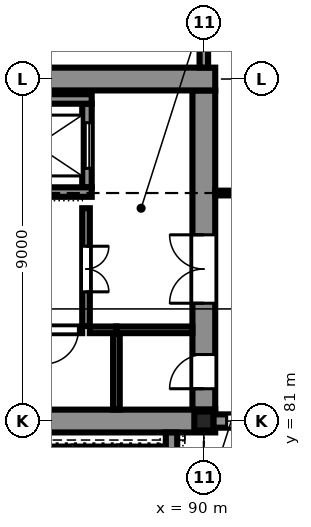
"""IFC4 building model, lengths in metres.
Left out: names, types, materials, properties, quantities, classifications, styles, units other than length and angle.
Written with IfcOpenShell. Run it as: python <this file> out.ifc"""

import sys

from ifc_helpers import new_model, si_unit, direction, frame, frame_2d, origin, origin_2d, place, context, subcontext, project, spatial, polyline, rectangle, hollow_rectangle, outline, extrude, element, fill, save


model = new_model("IFC4")
c1 = context("Model", 3, precision=1e-05, world=origin(), true_north=direction((0.0, 1.0)))
c2 = subcontext(c1, "Body", "Model", "MODEL_VIEW")
j1 = project(units=[si_unit("LENGTHUNIT", "METRE"), si_unit("PLANEANGLEUNIT", "RADIAN")], contexts=[c1])
p1 = place(None, origin())
s1 = spatial("IfcSite", under=j1, at=p1, CompositionType="ELEMENT")
p2 = place(p1, origin())
s2 = spatial("IfcBuilding", under=s1, at=p2, CompositionType="ELEMENT")
p3 = place(p2, origin())
s3 = spatial("IfcBuildingStorey", under=s2, at=p3, CompositionType="ELEMENT", Elevation=0.0)
p4 = place(p3, frame((90.0, 81.0, -2.1), z_axis=(0.0, 0.0, 1.0), x_axis=(1.0, 0.0, 0.0)))
e1 = element("IfcColumn", 1, at=p4, inside=s3, PredefinedType="COLUMN", context=c2, shape_type="SweptSolid", body=[
    extrude(hollow_rectangle(XDim=0.5, YDim=0.5, WallThickness=0.032, at=origin_2d()), origin(), (0.0, 0.0, 1.0), 9.6),
])
p5 = place(p3, frame((71.7, 81.0, -2.1), z_axis=(0.0, 0.0, 1.0), x_axis=(1.0, 0.0, 0.0)))
e2 = element("IfcWall", 2, at=p5, inside=s3, PredefinedType="SOLIDWALL", context=c2, shape_type="SweptSolid", body=[
    extrude(rectangle(XDim=18.6, YDim=0.6, at=frame_2d((9.3, 0.0))), origin(), (0.0, 0.0, 1.0), 9.6),
])
p6 = place(p5, frame((1.6, 0.0, 2.1)))
e3 = element("IfcOpeningElement", 3, at=p6, cuts=e2, PredefinedType="OPENING", context=c2, shape_type="SweptSolid", body=[
    extrude(rectangle(XDim=1.8, YDim=2.1, at=frame_2d((0.9, 1.05))), frame((0.0, 0.31, 0.0), z_axis=(0.0, -1.0, 0.0), x_axis=(1.0, 0.0, 0.0)), (0.0, 0.0, 1.0), 0.62),
])
p7 = place(p5, frame((5.6, 0.0, 2.1)))
e4 = element("IfcOpeningElement", 4, at=p7, cuts=e2, PredefinedType="OPENING", context=c2, shape_type="SweptSolid", body=[
    extrude(rectangle(XDim=1.8, YDim=2.1, at=frame_2d((0.9, 1.05))), frame((0.0, 0.31, 0.0), z_axis=(0.0, -1.0, 0.0), x_axis=(1.0, 0.0, 0.0)), (0.0, 0.0, 1.0), 0.62),
])
p8 = place(p5, frame((9.1, 0.0, 2.1)))
e5 = element("IfcOpeningElement", 5, at=p8, cuts=e2, PredefinedType="OPENING", context=c2, shape_type="SweptSolid", body=[
    extrude(rectangle(XDim=1.8, YDim=2.1, at=frame_2d((0.9, 1.05))), frame((0.0, 0.31, 0.0), z_axis=(0.0, -1.0, 0.0), x_axis=(1.0, 0.0, 0.0)), (0.0, 0.0, 1.0), 0.62),
])
p9 = place(p3, frame((71.7, 90.0, -2.1), z_axis=(0.0, 0.0, 1.0), x_axis=(1.0, 0.0, 0.0)))
e6 = element("IfcWall", 6, at=p9, inside=s3, PredefinedType="SOLIDWALL", context=c2, shape_type="SweptSolid", body=[
    extrude(rectangle(XDim=18.6, YDim=0.6, at=frame_2d((9.3, 0.0))), origin(), (0.0, 0.0, 1.0), 9.6),
])
p10 = place(p3, frame((90.0, 81.3, -2.1), z_axis=(0.0, 0.0, 1.0), x_axis=(0.0, 1.0, 0.0)))
e7 = element("IfcWall", 7, at=p10, inside=s3, PredefinedType="SOLIDWALL", context=c2, shape_type="SweptSolid", body=[
    extrude(rectangle(XDim=8.4, YDim=0.6, at=frame_2d((4.2, 0.0))), origin(), (0.0, 0.0, 1.0), 9.6),
])
p11 = place(p10, frame((2.8, 0.0, 2.1)))
e8 = element("IfcOpeningElement", 8, at=p11, cuts=e7, PredefinedType="OPENING", context=c2, shape_type="SweptSolid", body=[
    extrude(rectangle(XDim=1.8, YDim=2.1, at=frame_2d((0.9, 1.05))), frame((0.0, 0.31, 0.0), z_axis=(0.0, -1.0, 0.0), x_axis=(1.0, 0.0, 0.0)), (0.0, 0.0, 1.0), 0.62),
])
p12 = place(p10, frame((0.55, 0.0, 2.1)))
e9 = element("IfcOpeningElement", 9, at=p12, cuts=e7, PredefinedType="OPENING", context=c2, shape_type="SweptSolid", body=[
    extrude(rectangle(XDim=0.9, YDim=2.1, at=frame_2d((0.45, 1.05))), frame((0.0, 0.31, 0.0), z_axis=(0.0, -1.0, 0.0), x_axis=(1.0, 0.0, 0.0)), (0.0, 0.0, 1.0), 0.62),
])
p13 = place(p3, frame((90.25, 81.0, 0.0), z_axis=(0.0, 0.0, 1.0), x_axis=(1.0, 0.0, 0.0)))
e10 = element("IfcWall", 10, at=p13, inside=s3, PredefinedType="SOLIDWALL", context=c2, shape_type="SweptSolid", body=[
    extrude(rectangle(XDim=8.395, YDim=0.35, at=frame_2d((4.197, 0.0))), origin(), (0.0, 0.0, 1.0), 6.692),
])
p14 = place(p13, frame((3.05, 0.0, 0.0)))
e11 = element("IfcOpeningElement", 11, at=p14, cuts=e10, PredefinedType="OPENING", context=c2, shape_type="SweptSolid", body=[
    extrude(rectangle(XDim=2.4, YDim=3.0, at=frame_2d((1.2, 1.5))), frame((0.0, 0.185, 0.0), z_axis=(0.0, -1.0, 0.0), x_axis=(1.0, 0.0, 0.0)), (0.0, 0.0, 1.0), 0.37),
])
p15 = place(p13, frame((0.35, 0.0, 0.9)))
e12 = element("IfcOpeningElement", 12, at=p15, cuts=e10, PredefinedType="OPENING", context=c2, shape_type="SweptSolid", body=[
    extrude(rectangle(XDim=1.8, YDim=3.6, at=frame_2d((0.9, 1.8))), frame((0.0, 0.185, 0.0), z_axis=(0.0, -1.0, 0.0), x_axis=(1.0, 0.0, 0.0)), (0.0, 0.0, 1.0), 0.37),
])
p16 = place(p13, frame((6.35, 0.0, 0.9)))
e13 = element("IfcOpeningElement", 13, at=p16, cuts=e10, PredefinedType="OPENING", context=c2, shape_type="SweptSolid", body=[
    extrude(rectangle(XDim=1.8, YDim=3.6, at=frame_2d((0.9, 1.8))), frame((0.0, 0.185, 0.0), z_axis=(0.0, -1.0, 0.0), x_axis=(1.0, 0.0, 0.0)), (0.0, 0.0, 1.0), 0.37),
])
p17 = place(p3, frame((89.15, 72.6, 0.0), z_axis=(0.0, 0.0, 1.0), x_axis=(0.0, 1.0, 0.0)))
e14 = element("IfcWall", 14, at=p17, inside=s3, PredefinedType="SOLIDWALL", context=c2, shape_type="SweptSolid", body=[
    extrude(rectangle(XDim=8.098, YDim=0.3, at=frame_2d((4.049, 0.0))), origin(), (0.0, 0.0, 1.0), 6.902),
])
for number, where, z_axis, x_axis in (
    (15, (83.65, 87.025, -1.6), (0.0, 0.0, 1.0), (1.0, 0.0, 0.0)),
    (16, (83.65, 89.475, -1.6), (0.0, 0.0, 1.0), (1.0, 0.0, 0.0)),
):
    element("IfcWall", number, at=place(p3, frame(where, z_axis=z_axis, x_axis=x_axis)), inside=s3, PredefinedType="SOLIDWALL", context=c2, shape_type="SweptSolid", body=[
        extrude(rectangle(XDim=3.4, YDim=0.25, at=frame_2d((1.7, 0.0))), origin(), (0.0, 0.0, 1.0), 8.436),
    ])
p18 = place(p3, frame((86.925, 87.15, -1.6), z_axis=(0.0, 0.0, 1.0), x_axis=(0.0, 1.0, 0.0)))
e17 = element("IfcWall", 17, at=p18, inside=s3, PredefinedType="SOLIDWALL", context=c2, shape_type="SweptSolid", body=[
    extrude(rectangle(XDim=2.2, YDim=0.25, at=frame_2d((1.1, 0.0))), origin(), (0.0, 0.0, 1.0), 8.436),
])
p19 = place(p18, frame((0.5, 0.0, 1.6)))
e18 = element("IfcOpeningElement", 18, at=p19, cuts=e17, PredefinedType="OPENING", context=c2, shape_type="SweptSolid", body=[
    extrude(rectangle(XDim=1.2, YDim=2.1, at=frame_2d((0.6, 1.05))), frame((0.0, 0.135, 0.0), z_axis=(0.0, -1.0, 0.0), x_axis=(1.0, 0.0, 0.0)), (0.0, 0.0, 1.0), 0.27),
])
p20 = place(p3, frame((90.302, 87.0, 0.0), z_axis=(0.0, 0.0, 1.0), x_axis=(1.0, 0.0, 0.0)))
e19 = element("IfcWall", 19, at=p20, inside=s3, PredefinedType="PARTITIONING", context=c2, shape_type="SweptSolid", body=[
    extrude(rectangle(XDim=8.76, YDim=0.125, at=frame_2d((4.38, 0.0))), origin(), (0.0, 0.0, 1.0), 6.757),
])
p21 = place(p20, frame((3.598, 0.0, 0.0)))
e20 = element("IfcOpeningElement", 20, at=p21, cuts=e19, PredefinedType="OPENING", context=c2, shape_type="SweptSolid", body=[
    extrude(rectangle(XDim=1.2, YDim=2.1, at=frame_2d((0.6, 1.05))), frame((0.0, 0.073, 0.0), z_axis=(0.0, -1.0, 0.0), x_axis=(1.0, 0.0, 0.0)), (0.0, 0.0, 1.0), 0.145),
])
p22 = place(p3, frame((90.0, 95.887, 0.0), z_axis=(0.0, 0.0, 1.0), x_axis=(0.0, -1.0, 0.0)))
e21 = element("IfcWall", 21, at=p22, inside=s3, PredefinedType="PARTITIONING", context=c2, shape_type="SweptSolid", body=[
    extrude(rectangle(XDim=5.585, YDim=0.225, at=frame_2d((2.793, 0.0))), origin(), (0.0, 0.0, 1.0), 6.6),
])
p23 = place(p3, frame((86.8, 83.4, 0.0), z_axis=(0.0, 0.0, 1.0), x_axis=(-1.0, 0.0, 0.0)))
e22 = element("IfcWall", 22, at=p23, inside=s3, PredefinedType="PARTITIONING", context=c2, shape_type="SweptSolid", body=[
    extrude(rectangle(XDim=1.1, YDim=0.175, at=frame_2d((0.55, 0.0))), origin(), (0.0, 0.0, 1.0), 6.459),
])
p24 = place(p23, frame((0.1, 0.0, 0.0)))
e23 = element("IfcOpeningElement", 23, at=p24, cuts=e22, PredefinedType="OPENING", context=c2, shape_type="SweptSolid", body=[
    extrude(rectangle(XDim=0.9, YDim=2.1, at=frame_2d((0.45, 1.05))), frame((0.0, 0.097, 0.0), z_axis=(0.0, -1.0, 0.0), x_axis=(1.0, 0.0, 0.0)), (0.0, 0.0, 1.0), 0.195),
])
p25 = place(p3, frame((86.9, 86.6, 0.0), z_axis=(0.0, 0.0, 1.0), x_axis=(0.0, -1.0, 0.0)))
e24 = element("IfcWall", 24, at=p25, inside=s3, PredefinedType="PARTITIONING", context=c2, shape_type="SweptSolid", body=[
    extrude(rectangle(XDim=3.1, YDim=0.2, at=frame_2d((1.55, 0.0))), origin(), (0.0, 0.0, 1.0), 6.6),
])
p26 = place(p25, frame((1.0, 0.0, 0.0)))
e25 = element("IfcOpeningElement", 25, at=p26, cuts=e24, PredefinedType="OPENING", context=c2, shape_type="SweptSolid", body=[
    extrude(rectangle(XDim=1.2, YDim=2.1, at=frame_2d((0.6, 1.05))), frame((0.0, 0.11, 0.0), z_axis=(0.0, -1.0, 0.0), x_axis=(1.0, 0.0, 0.0)), (0.0, 0.0, 1.0), 0.22),
])
p27 = place(p3, frame((87.7, 83.4, 0.0), z_axis=(0.0, 0.0, 1.0), x_axis=(-1.0, 0.0, 0.0)))
e26 = element("IfcWall", 26, at=p27, inside=s3, PredefinedType="PARTITIONING", context=c2, shape_type="SweptSolid", body=[
    extrude(rectangle(XDim=0.7, YDim=0.175, at=frame_2d((0.35, 0.0))), origin(), (0.0, 0.0, 1.0), 6.459),
])
for number, where, z_axis, x_axis in (
    (27, (89.698, 83.4, 0.0), (0.0, 0.0, 1.0), (-1.0, 0.0, 0.0)),
    (28, (87.7, 83.3, 0.0), (0.0, 0.0, 1.0), (0.0, -1.0, 0.0)),
):
    element("IfcWall", number, at=place(p3, frame(where, z_axis=z_axis, x_axis=x_axis)), inside=s3, PredefinedType="PARTITIONING", context=c2, shape_type="SweptSolid", body=[
        extrude(rectangle(XDim=1.998, YDim=0.175, at=frame_2d((0.999, 0.0))), origin(), (0.0, 0.0, 1.0), 6.459),
    ])
p28 = place(p15, origin())
e29 = element("IfcWindow", 29, at=p28, inside=s3, PartitioningType="TRIPLE_PANEL_HORIZONTAL", PredefinedType="WINDOW", context=c2, shape_type="SweptSolid", body=[
    extrude(outline(polyline([(0.0, 0.0), (1.8, 0.0), (1.8, 3.6), (0.0, 3.6), (0.0, 0.0)]), holes=[polyline([(0.07, 0.07), (1.73, 0.07), (1.73, 3.53), (0.07, 3.53), (0.07, 0.07)])]), frame((0.0, 0.03, 0.0), z_axis=(0.0, -1.0, 0.0), x_axis=(1.0, 0.0, 0.0)), (0.0, 0.0, 1.0), 0.06),
    extrude(rectangle(XDim=1.66, YDim=0.04, at=frame_2d((0.9, 1.217))), frame((0.0, 0.021, 0.0), z_axis=(0.0, -1.0, 0.0), x_axis=(1.0, 0.0, 0.0)), (0.0, 0.0, 1.0), 0.043),
    extrude(rectangle(XDim=1.66, YDim=0.04, at=frame_2d((0.9, 2.383))), frame((0.0, 0.021, 0.0), z_axis=(0.0, -1.0, 0.0), x_axis=(1.0, 0.0, 0.0)), (0.0, 0.0, 1.0), 0.043),
    extrude(outline(polyline([(0.07, 0.07), (1.73, 0.07), (1.73, 1.197), (0.07, 1.197), (0.07, 0.07)]), holes=[polyline([(0.1, 0.1), (1.7, 0.1), (1.7, 1.167), (0.1, 1.167), (0.1, 0.1)])]), frame((0.0, 0.022, 0.0), z_axis=(0.0, -1.0, 0.0), x_axis=(1.0, 0.0, 0.0)), (0.0, 0.0, 1.0), 0.045),
    extrude(rectangle(XDim=1.6, YDim=1.067, at=frame_2d((0.9, 0.633))), frame((0.0, 0.006, 0.0), z_axis=(0.0, -1.0, 0.0), x_axis=(1.0, 0.0, 0.0)), (0.0, 0.0, 1.0), 0.012),
    extrude(outline(polyline([(0.07, 1.237), (1.73, 1.237), (1.73, 2.363), (0.07, 2.363), (0.07, 1.237)]), holes=[polyline([(0.1, 1.267), (1.7, 1.267), (1.7, 2.333), (0.1, 2.333), (0.1, 1.267)])]), frame((0.0, 0.022, 0.0), z_axis=(0.0, -1.0, 0.0), x_axis=(1.0, 0.0, 0.0)), (0.0, 0.0, 1.0), 0.045),
    extrude(rectangle(XDim=1.6, YDim=1.066, at=frame_2d((0.9, 1.8))), frame((0.0, 0.006, 0.0), z_axis=(0.0, -1.0, 0.0), x_axis=(1.0, 0.0, 0.0)), (0.0, 0.0, 1.0), 0.012),
    extrude(outline(polyline([(0.07, 2.403), (1.73, 2.403), (1.73, 3.53), (0.07, 3.53), (0.07, 2.403)]), holes=[polyline([(0.1, 2.433), (1.7, 2.433), (1.7, 3.5), (0.1, 3.5), (0.1, 2.433)])]), frame((0.0, 0.022, 0.0), z_axis=(0.0, -1.0, 0.0), x_axis=(1.0, 0.0, 0.0)), (0.0, 0.0, 1.0), 0.045),
    extrude(rectangle(XDim=1.6, YDim=1.067, at=frame_2d((0.9, 2.967))), frame((0.0, 0.006, 0.0), z_axis=(0.0, -1.0, 0.0), x_axis=(1.0, 0.0, 0.0)), (0.0, 0.0, 1.0), 0.012),
])
fill(e12, e29)
p29 = place(p19, origin())
e30 = element("IfcDoor", 30, at=p29, inside=s3, OperationType="SLIDING_TO_LEFT", PredefinedType="DOOR", context=c2, shape_type="SweptSolid", body=[
    extrude(outline(polyline([(0.0, 0.0), (0.07, 0.0), (0.07, 2.03), (1.13, 2.03), (1.13, 0.0), (1.2, 0.0), (1.2, 2.1), (0.0, 2.1), (0.0, 0.0)])), frame((0.0, 0.025, 0.0), z_axis=(0.0, -1.0, 0.0), x_axis=(1.0, 0.0, 0.0)), (0.0, 0.0, 1.0), 0.05),
    extrude(rectangle(XDim=0.579, YDim=2.016, at=frame_2d((0.363, 1.018))), frame((0.0, 0.018, 0.0), z_axis=(0.0, -1.0, 0.0), x_axis=(1.0, 0.0, 0.0)), (0.0, 0.0, 1.0), 0.016),
    extrude(rectangle(XDim=0.575, YDim=2.016, at=frame_2d((0.839, 1.018))), frame((0.0, -0.002, 0.0), z_axis=(0.0, -1.0, 0.0), x_axis=(1.0, 0.0, 0.0)), (0.0, 0.0, 1.0), 0.016),
])
fill(e18, e30)
p30 = place(p26, origin())
e31 = element("IfcDoor", 31, at=p30, inside=s3, OperationType="DOUBLE_DOOR_SINGLE_SWING", PredefinedType="DOOR", context=c2, shape_type="SweptSolid", body=[
    extrude(outline(polyline([(0.0, 0.0), (0.07, 0.0), (0.07, 2.03), (1.13, 2.03), (1.13, 0.0), (1.2, 0.0), (1.2, 2.1), (0.0, 2.1), (0.0, 0.0)])), frame((0.0, 0.025, 0.0), z_axis=(0.0, -1.0, 0.0), x_axis=(1.0, 0.0, 0.0)), (0.0, 0.0, 1.0), 0.05),
    extrude(outline(polyline([(0.074, 0.01), (0.597, 0.01), (0.597, 2.026), (0.074, 2.026), (0.074, 0.01)]), holes=[polyline([(0.178, 0.373), (0.492, 0.373), (0.492, 1.784), (0.178, 1.784), (0.178, 0.373)])]), frame((0.0, 0.017, 0.0), z_axis=(0.0, -1.0, 0.0), x_axis=(1.0, 0.0, 0.0)), (0.0, 0.0, 1.0), 0.035),
    extrude(rectangle(XDim=0.314, YDim=1.411, at=frame_2d((0.335, 1.079))), frame((0.0, 0.009, 0.0), z_axis=(0.0, -1.0, 0.0), x_axis=(1.0, 0.0, 0.0)), (0.0, 0.0, 1.0), 0.017),
    extrude(outline(polyline([(0.603, 0.01), (1.126, 0.01), (1.126, 2.026), (0.603, 2.026), (0.603, 0.01)]), holes=[polyline([(0.708, 0.373), (1.021, 0.373), (1.021, 1.784), (0.708, 1.784), (0.708, 0.373)])]), frame((0.0, 0.017, 0.0), z_axis=(0.0, -1.0, 0.0), x_axis=(1.0, 0.0, 0.0)), (0.0, 0.0, 1.0), 0.035),
    extrude(rectangle(XDim=0.314, YDim=1.411, at=frame_2d((0.865, 1.079))), frame((0.0, 0.009, 0.0), z_axis=(0.0, -1.0, 0.0), x_axis=(1.0, 0.0, 0.0)), (0.0, 0.0, 1.0), 0.017),
])
fill(e25, e31)
p31 = place(p11, origin())
e32 = element("IfcDoor", 32, at=p31, inside=s3, OperationType="DOUBLE_DOOR_SINGLE_SWING", PredefinedType="DOOR", context=c2, shape_type="SweptSolid", body=[
    extrude(outline(polyline([(0.0, 0.0), (0.07, 0.0), (0.07, 2.03), (1.73, 2.03), (1.73, 0.0), (1.8, 0.0), (1.8, 2.1), (0.0, 2.1), (0.0, 0.0)])), frame((0.0, 0.025, 0.0), z_axis=(0.0, -1.0, 0.0), x_axis=(1.0, 0.0, 0.0)), (0.0, 0.0, 1.0), 0.05),
    extrude(outline(polyline([(0.074, 0.01), (0.897, 0.01), (0.897, 2.026), (0.074, 2.026), (0.074, 0.01)]), holes=[polyline([(0.194, 0.16), (0.777, 0.16), (0.777, 1.01), (0.194, 1.01), (0.194, 0.16)]), polyline([(0.335, 1.16), (0.635, 1.16), (0.635, 1.76), (0.335, 1.76), (0.335, 1.16)])]), frame((0.0, 0.017, 0.0), z_axis=(0.0, -1.0, 0.0), x_axis=(1.0, 0.0, 0.0)), (0.0, 0.0, 1.0), 0.035),
    extrude(rectangle(XDim=0.583, YDim=0.85, at=frame_2d((0.485, 0.585))), frame((0.0, 0.009, 0.0), z_axis=(0.0, -1.0, 0.0), x_axis=(1.0, 0.0, 0.0)), (0.0, 0.0, 1.0), 0.017),
    extrude(rectangle(XDim=0.3, YDim=0.6, at=frame_2d((0.485, 1.46))), frame((0.0, 0.006, 0.0), z_axis=(0.0, -1.0, 0.0), x_axis=(1.0, 0.0, 0.0)), (0.0, 0.0, 1.0), 0.012),
    extrude(outline(polyline([(0.903, 0.01), (1.726, 0.01), (1.726, 2.026), (0.903, 2.026), (0.903, 0.01)]), holes=[polyline([(1.023, 0.16), (1.606, 0.16), (1.606, 1.01), (1.023, 1.01), (1.023, 0.16)]), polyline([(1.165, 1.16), (1.465, 1.16), (1.465, 1.76), (1.165, 1.76), (1.165, 1.16)])]), frame((0.0, 0.017, 0.0), z_axis=(0.0, -1.0, 0.0), x_axis=(1.0, 0.0, 0.0)), (0.0, 0.0, 1.0), 0.035),
    extrude(rectangle(XDim=0.583, YDim=0.85, at=frame_2d((1.314, 0.585))), frame((0.0, 0.009, 0.0), z_axis=(0.0, -1.0, 0.0), x_axis=(1.0, 0.0, 0.0)), (0.0, 0.0, 1.0), 0.017),
    extrude(rectangle(XDim=0.3, YDim=0.6, at=frame_2d((1.314, 1.46))), frame((0.0, 0.006, 0.0), z_axis=(0.0, -1.0, 0.0), x_axis=(1.0, 0.0, 0.0)), (0.0, 0.0, 1.0), 0.012),
])
fill(e8, e32)
p32 = place(p24, origin())
e33 = element("IfcDoor", 33, at=p32, inside=s3, OperationType="SINGLE_SWING_RIGHT", PredefinedType="DOOR", context=c2, shape_type="SweptSolid", body=[
    extrude(outline(polyline([(0.0, 0.0), (0.07, 0.0), (0.07, 2.03), (0.83, 2.03), (0.83, 0.0), (0.9, 0.0), (0.9, 2.1), (0.0, 2.1), (0.0, 0.0)])), frame((0.0, 0.025, 0.0), z_axis=(0.0, -1.0, 0.0), x_axis=(1.0, 0.0, 0.0)), (0.0, 0.0, 1.0), 0.05),
    extrude(outline(polyline([(0.074, 0.01), (0.826, 0.01), (0.826, 2.026), (0.074, 2.026), (0.074, 0.01)]), holes=[polyline([(0.194, 0.16), (0.706, 0.16), (0.706, 1.01), (0.194, 1.01), (0.194, 0.16)]), polyline([(0.3, 1.16), (0.6, 1.16), (0.6, 1.76), (0.3, 1.76), (0.3, 1.16)])]), frame((0.0, 0.017, 0.0), z_axis=(0.0, -1.0, 0.0), x_axis=(1.0, 0.0, 0.0)), (0.0, 0.0, 1.0), 0.035),
    extrude(rectangle(XDim=0.512, YDim=0.85, at=frame_2d((0.45, 0.585))), frame((0.0, 0.009, 0.0), z_axis=(0.0, -1.0, 0.0), x_axis=(1.0, 0.0, 0.0)), (0.0, 0.0, 1.0), 0.017),
    extrude(rectangle(XDim=0.3, YDim=0.6, at=frame_2d((0.45, 1.46))), frame((0.0, 0.006, 0.0), z_axis=(0.0, -1.0, 0.0), x_axis=(1.0, 0.0, 0.0)), (0.0, 0.0, 1.0), 0.012),
])
fill(e23, e33)
p33 = place(p12, origin())
e34 = element("IfcDoor", 34, at=p33, inside=s3, OperationType="SINGLE_SWING_LEFT", PredefinedType="DOOR", context=c2, shape_type="SweptSolid", body=[
    extrude(outline(polyline([(0.0, 0.0), (0.07, 0.0), (0.07, 2.03), (0.83, 2.03), (0.83, 0.0), (0.9, 0.0), (0.9, 2.1), (0.0, 2.1), (0.0, 0.0)])), frame((0.0, 0.025, 0.0), z_axis=(0.0, -1.0, 0.0), x_axis=(1.0, 0.0, 0.0)), (0.0, 0.0, 1.0), 0.05),
    extrude(outline(polyline([(0.074, 0.01), (0.826, 0.01), (0.826, 2.026), (0.074, 2.026), (0.074, 0.01)]), holes=[polyline([(0.194, 0.16), (0.706, 0.16), (0.706, 1.01), (0.194, 1.01), (0.194, 0.16)]), polyline([(0.3, 1.16), (0.6, 1.16), (0.6, 1.76), (0.3, 1.76), (0.3, 1.16)])]), frame((0.0, 0.017, 0.0), z_axis=(0.0, -1.0, 0.0), x_axis=(1.0, 0.0, 0.0)), (0.0, 0.0, 1.0), 0.035),
    extrude(rectangle(XDim=0.512, YDim=0.85, at=frame_2d((0.45, 0.585))), frame((0.0, 0.009, 0.0), z_axis=(0.0, -1.0, 0.0), x_axis=(1.0, 0.0, 0.0)), (0.0, 0.0, 1.0), 0.017),
    extrude(rectangle(XDim=0.3, YDim=0.6, at=frame_2d((0.45, 1.46))), frame((0.0, 0.006, 0.0), z_axis=(0.0, -1.0, 0.0), x_axis=(1.0, 0.0, 0.0)), (0.0, 0.0, 1.0), 0.012),
])
fill(e9, e34)
save(model, sys.argv[1])
